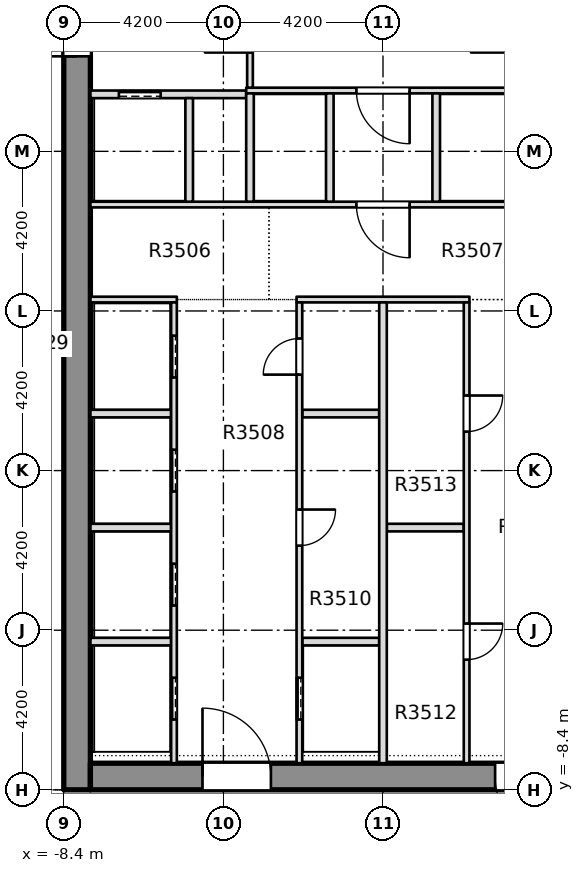
"""IFC4 building model, lengths in metres.
Left out: names, types, materials, properties, quantities, classifications, styles, units other than length and angle.
Written with IfcOpenShell. Run it as: python <this file> out.ifc"""

import sys

from ifc_helpers import new_model, si_unit, direction, frame, frame_2d, origin, place, context, subcontext, project, spatial, rectangle, extrude, element, fill, save


model = new_model("IFC4")
c1 = context("Model", 3, precision=1e-05, world=origin(), true_north=direction((0.0, 1.0)))
c2 = subcontext(c1, "Body", "Model", "MODEL_VIEW")
j1 = project(units=[si_unit("LENGTHUNIT", "METRE"), si_unit("PLANEANGLEUNIT", "RADIAN")], contexts=[c1])
p1 = place(None, origin())
s1 = spatial("IfcSite", under=j1, at=p1, CompositionType="ELEMENT")
p2 = place(p1, origin())
s2 = spatial("IfcBuilding", under=s1, at=p2, CompositionType="ELEMENT")
p3 = place(p2, frame((0.0, 0.0, 140.0)))
s3 = spatial("IfcBuildingStorey", under=s2, at=p3, CompositionType="ELEMENT", Elevation=140.0)
p4 = place(p3, frame((-8.05, -8.4, -0.4), z_axis=(0.0, 0.0, 1.0), x_axis=(0.0, 1.0, 0.0)))
e1 = element("IfcWall", 1, at=p4, inside=s3, PredefinedType="SOLIDWALL", context=c2, shape_type="SweptSolid", body=[
    extrude(rectangle(XDim=30.15, YDim=0.7, at=frame_2d((15.075, 0.0))), origin(), (0.0, 0.0, 1.0), 3.45),
])
p5 = place(p4, frame((19.3, 0.0, 0.4)))
e2 = element("IfcOpeningElement", 2, at=p5, cuts=e1, PredefinedType="OPENING", context=c2, shape_type="SweptSolid", body=[
    extrude(rectangle(XDim=1.2, YDim=2.1, at=frame_2d((0.6, 1.05))), frame((0.0, 0.36, 0.0), z_axis=(0.0, -1.0, 0.0), x_axis=(1.0, 0.0, 0.0)), (0.0, 0.0, 1.0), 0.72),
])
p6 = place(p3, frame((-7.7, -8.05, -0.4), z_axis=(0.0, 0.0, 1.0), x_axis=(1.0, 0.0, 0.0)))
e3 = element("IfcWall", 3, at=p6, inside=s3, PredefinedType="SHEAR", context=c2, shape_type="SweptSolid", body=[
    extrude(rectangle(XDim=15.4, YDim=0.7, at=frame_2d((7.7, 0.0))), origin(), (0.0, 0.0, 1.0), 3.45),
])
p7 = place(p6, frame((2.95, 0.0, 0.4)))
e4 = element("IfcOpeningElement", 4, at=p7, cuts=e3, PredefinedType="OPENING", context=c2, shape_type="SweptSolid", body=[
    extrude(rectangle(XDim=1.8, YDim=2.1, at=frame_2d((0.9, 1.05))), frame((0.0, 0.36, 0.0), z_axis=(0.0, -1.0, 0.0), x_axis=(1.0, 0.0, 0.0)), (0.0, 0.0, 1.0), 0.72),
])
p8 = place(p6, frame((10.65, 0.0, 0.4)))
e5 = element("IfcOpeningElement", 5, at=p8, cuts=e3, PredefinedType="OPENING", context=c2, shape_type="SweptSolid", body=[
    extrude(rectangle(XDim=1.8, YDim=2.1, at=frame_2d((0.9, 1.05))), frame((0.0, 0.36, 0.0), z_axis=(0.0, -1.0, 0.0), x_axis=(1.0, 0.0, 0.0)), (0.0, 0.0, 1.0), 0.72),
])
p9 = place(p3, frame((-7.699, -4.5, 0.0), z_axis=(0.0, 0.0, 1.0), x_axis=(1.0, 0.0, 0.0)))
e6 = element("IfcWall", 6, at=p9, inside=s3, PredefinedType="PARTITIONING", context=c2, shape_type="SweptSolid", body=[
    extrude(rectangle(XDim=2.124, YDim=0.2, at=frame_2d((1.062, 0.0))), origin(), (0.0, 0.0, 1.0), 3.05),
])
p10 = place(p3, frame((-2.125, -4.5, 0.0), z_axis=(0.0, 0.0, 1.0), x_axis=(1.0, 0.0, 0.0)))
e7 = element("IfcWall", 7, at=p10, inside=s3, PredefinedType="PARTITIONING", context=c2, shape_type="SweptSolid", body=[
    extrude(rectangle(XDim=2.025, YDim=0.2, at=frame_2d((1.012, 0.0))), origin(), (0.0, 0.0, 1.0), 3.05),
])
p11 = place(p3, frame((-7.699, -1.5, 0.0), z_axis=(0.0, 0.0, 1.0), x_axis=(1.0, 0.0, 0.0)))
e8 = element("IfcWall", 8, at=p11, inside=s3, PredefinedType="PARTITIONING", context=c2, shape_type="SweptSolid", body=[
    extrude(rectangle(XDim=2.124, YDim=0.2, at=frame_2d((1.062, 0.0))), origin(), (0.0, 0.0, 1.0), 3.05),
])
p12 = place(p3, frame((0.1, -1.5, 0.0), z_axis=(0.0, 0.0, 1.0), x_axis=(1.0, 0.0, 0.0)))
e9 = element("IfcWall", 9, at=p12, inside=s3, PredefinedType="PARTITIONING", context=c2, shape_type="SweptSolid", body=[
    extrude(rectangle(XDim=2.025, YDim=0.2, at=frame_2d((1.012, 0.0))), origin(), (0.0, 0.0, 1.0), 3.05),
])
p13 = place(p3, frame((-7.699, 1.5, 0.0), z_axis=(0.0, 0.0, 1.0), x_axis=(1.0, 0.0, 0.0)))
e10 = element("IfcWall", 10, at=p13, inside=s3, PredefinedType="PARTITIONING", context=c2, shape_type="SweptSolid", body=[
    extrude(rectangle(XDim=2.124, YDim=0.2, at=frame_2d((1.062, 0.0))), origin(), (0.0, 0.0, 1.0), 3.05),
])
p14 = place(p3, frame((-2.125, 1.5, 0.0), z_axis=(0.0, 0.0, 1.0), x_axis=(1.0, 0.0, 0.0)))
e11 = element("IfcWall", 11, at=p14, inside=s3, PredefinedType="PARTITIONING", context=c2, shape_type="SweptSolid", body=[
    extrude(rectangle(XDim=2.025, YDim=0.2, at=frame_2d((1.012, 0.0))), origin(), (0.0, 0.0, 1.0), 3.05),
])
p15 = place(p3, frame((-7.699, 4.5, 0.0), z_axis=(0.0, 0.0, 1.0), x_axis=(1.0, 0.0, 0.0)))
e12 = element("IfcWall", 12, at=p15, inside=s3, PredefinedType="PARTITIONING", context=c2, shape_type="SweptSolid", body=[
    extrude(rectangle(XDim=2.274, YDim=0.15, at=frame_2d((1.137, 0.0))), origin(), (0.0, 0.0, 1.0), 3.05),
])
p16 = place(p3, frame((-2.275, 4.5, 0.0), z_axis=(0.0, 0.0, 1.0), x_axis=(1.0, 0.0, 0.0)))
e13 = element("IfcWall", 13, at=p16, inside=s3, PredefinedType="PARTITIONING", context=c2, shape_type="SweptSolid", body=[
    extrude(rectangle(XDim=4.55, YDim=0.15, at=frame_2d((2.275, 0.0))), origin(), (0.0, 0.0, 1.0), 3.05),
])
p17 = place(p3, frame((-7.699, 7.0, 0.0), z_axis=(0.0, 0.0, 1.0), x_axis=(1.0, 0.0, 0.0)))
e14 = element("IfcWall", 14, at=p17, inside=s3, PredefinedType="PARTITIONING", context=c2, shape_type="SweptSolid", body=[
    extrude(rectangle(XDim=15.398, YDim=0.15, at=frame_2d((7.699, 0.0))), origin(), (0.0, 0.0, 1.0), 3.05),
])
p18 = place(p17, frame((6.999, 0.0, 0.0)))
e15 = element("IfcOpeningElement", 15, at=p18, cuts=e14, PredefinedType="OPENING", context=c2, shape_type="SweptSolid", body=[
    extrude(rectangle(XDim=1.4, YDim=2.1, at=frame_2d((0.7, 1.05))), frame((0.0, 0.085, 0.0), z_axis=(0.0, -1.0, 0.0), x_axis=(1.0, 0.0, 0.0)), (0.0, 0.0, 1.0), 0.17),
])
p19 = place(p3, frame((-7.699, 9.9, 0.0), z_axis=(0.0, 0.0, 1.0), x_axis=(1.0, 0.0, 0.0)))
e16 = element("IfcWall", 16, at=p19, inside=s3, PredefinedType="PARTITIONING", context=c2, shape_type="SweptSolid", body=[
    extrude(rectangle(XDim=4.099, YDim=0.2, at=frame_2d((2.049, 0.0))), origin(), (0.0, 0.0, 1.0), 3.05),
])
p20 = place(p19, frame((0.749, 0.0, 0.0)))
e17 = element("IfcOpeningElement", 17, at=p20, cuts=e16, PredefinedType="OPENING", context=c2, shape_type="SweptSolid", body=[
    extrude(rectangle(XDim=1.1, YDim=2.1, at=frame_2d((0.55, 1.05))), frame((0.0, 0.11, 0.0), z_axis=(0.0, -1.0, 0.0), x_axis=(1.0, 0.0, 0.0)), (0.0, 0.0, 1.0), 0.22),
])
p21 = place(p3, frame((-3.6, 10.0, 0.0), z_axis=(0.0, 0.0, 1.0), x_axis=(1.0, 0.0, 0.0)))
e18 = element("IfcWall", 18, at=p21, inside=s3, PredefinedType="PARTITIONING", context=c2, shape_type="SweptSolid", body=[
    extrude(rectangle(XDim=7.2, YDim=0.15, at=frame_2d((3.6, 0.0))), origin(), (0.0, 0.0, 1.0), 3.05),
])
p22 = place(p21, frame((2.9, 0.0, 0.0)))
e19 = element("IfcOpeningElement", 19, at=p22, cuts=e18, PredefinedType="OPENING", context=c2, shape_type="SweptSolid", body=[
    extrude(rectangle(XDim=1.4, YDim=2.1, at=frame_2d((0.7, 1.05))), frame((0.0, 0.085, 0.0), z_axis=(0.0, -1.0, 0.0), x_axis=(1.0, 0.0, 0.0)), (0.0, 0.0, 1.0), 0.17),
])
p23 = place(p3, frame((-5.5, -7.699, 0.0), z_axis=(0.0, 0.0, 1.0), x_axis=(0.0, 1.0, 0.0)))
e20 = element("IfcWall", 20, at=p23, inside=s3, PredefinedType="PARTITIONING", context=c2, shape_type="SweptSolid", body=[
    extrude(rectangle(XDim=12.124, YDim=0.15, at=frame_2d((6.062, 0.0))), origin(), (0.0, 0.0, 1.0), 3.05),
])
p24 = place(p23, frame((1.149, 0.0, 0.0)))
e21 = element("IfcOpeningElement", 21, at=p24, cuts=e20, PredefinedType="OPENING", context=c2, shape_type="SweptSolid", body=[
    extrude(rectangle(XDim=1.1, YDim=2.1, at=frame_2d((0.55, 1.05))), frame((0.0, 0.085, 0.0), z_axis=(0.0, -1.0, 0.0), x_axis=(1.0, 0.0, 0.0)), (0.0, 0.0, 1.0), 0.17),
])
p25 = place(p23, frame((4.149, 0.0, 0.0)))
e22 = element("IfcOpeningElement", 22, at=p25, cuts=e20, PredefinedType="OPENING", context=c2, shape_type="SweptSolid", body=[
    extrude(rectangle(XDim=1.1, YDim=2.1, at=frame_2d((0.55, 1.05))), frame((0.0, 0.085, 0.0), z_axis=(0.0, -1.0, 0.0), x_axis=(1.0, 0.0, 0.0)), (0.0, 0.0, 1.0), 0.17),
])
p26 = place(p23, frame((7.149, 0.0, 0.0)))
e23 = element("IfcOpeningElement", 23, at=p26, cuts=e20, PredefinedType="OPENING", context=c2, shape_type="SweptSolid", body=[
    extrude(rectangle(XDim=1.1, YDim=2.1, at=frame_2d((0.55, 1.05))), frame((0.0, 0.085, 0.0), z_axis=(0.0, -1.0, 0.0), x_axis=(1.0, 0.0, 0.0)), (0.0, 0.0, 1.0), 0.17),
])
p27 = place(p23, frame((10.149, 0.0, 0.0)))
e24 = element("IfcOpeningElement", 24, at=p27, cuts=e20, PredefinedType="OPENING", context=c2, shape_type="SweptSolid", body=[
    extrude(rectangle(XDim=1.1, YDim=2.1, at=frame_2d((0.55, 1.05))), frame((0.0, 0.085, 0.0), z_axis=(0.0, -1.0, 0.0), x_axis=(1.0, 0.0, 0.0)), (0.0, 0.0, 1.0), 0.17),
])
p28 = place(p3, frame((-5.1, 7.075, 0.0), z_axis=(0.0, 0.0, 1.0), x_axis=(0.0, 1.0, 0.0)))
e25 = element("IfcWall", 25, at=p28, inside=s3, PredefinedType="PARTITIONING", context=c2, shape_type="SweptSolid", body=[
    extrude(rectangle(XDim=2.725, YDim=0.2, at=frame_2d((1.363, 0.0))), origin(), (0.0, 0.0, 1.0), 3.05),
])
p29 = place(p3, frame((-3.5, 7.075, 0.0), z_axis=(0.0, 0.0, 1.0), x_axis=(0.0, 1.0, 0.0)))
e26 = element("IfcWall", 26, at=p29, inside=s3, PredefinedType="PARTITIONING", context=c2, shape_type="SweptSolid", body=[
    extrude(rectangle(XDim=2.85, YDim=0.2, at=frame_2d((1.425, 0.0))), origin(), (0.0, 0.0, 1.0), 3.05),
])
p30 = place(p3, frame((-3.5, 10.075, 0.0), z_axis=(0.0, 0.0, 1.0), x_axis=(0.0, 1.0, 0.0)))
e27 = element("IfcWall", 27, at=p30, inside=s3, PredefinedType="PARTITIONING", context=c2, shape_type="SweptSolid", body=[
    extrude(rectangle(XDim=3.075, YDim=0.15, at=frame_2d((1.538, 0.0))), origin(), (0.0, 0.0, 1.0), 3.05),
])
p31 = place(p30, frame((0.925, 0.0, 0.0)))
e28 = element("IfcOpeningElement", 28, at=p31, cuts=e27, PredefinedType="OPENING", context=c2, shape_type="SweptSolid", body=[
    extrude(rectangle(XDim=1.2, YDim=2.1, at=frame_2d((0.6, 1.05))), frame((0.0, 0.085, 0.0), z_axis=(0.0, -1.0, 0.0), x_axis=(1.0, 0.0, 0.0)), (0.0, 0.0, 1.0), 0.17),
])
p32 = place(p3, frame((-2.2, -7.699, 0.0), z_axis=(0.0, 0.0, 1.0), x_axis=(0.0, 1.0, 0.0)))
e29 = element("IfcWall", 29, at=p32, inside=s3, PredefinedType="PARTITIONING", context=c2, shape_type="SweptSolid", body=[
    extrude(rectangle(XDim=12.124, YDim=0.15, at=frame_2d((6.062, 0.0))), origin(), (0.0, 0.0, 1.0), 3.05),
])
p33 = place(p32, frame((1.149, 0.0, 0.0)))
e30 = element("IfcOpeningElement", 30, at=p33, cuts=e29, PredefinedType="OPENING", context=c2, shape_type="SweptSolid", body=[
    extrude(rectangle(XDim=1.1, YDim=2.1, at=frame_2d((0.55, 1.05))), frame((0.0, 0.085, 0.0), z_axis=(0.0, -1.0, 0.0), x_axis=(1.0, 0.0, 0.0)), (0.0, 0.0, 1.0), 0.17),
])
p34 = place(p32, frame((5.724, 0.0, 0.0)))
e31 = element("IfcOpeningElement", 31, at=p34, cuts=e29, PredefinedType="OPENING", context=c2, shape_type="SweptSolid", body=[
    extrude(rectangle(XDim=0.95, YDim=2.1, at=frame_2d((0.475, 1.05))), frame((0.0, 0.085, 0.0), z_axis=(0.0, -1.0, 0.0), x_axis=(1.0, 0.0, 0.0)), (0.0, 0.0, 1.0), 0.17),
])
p35 = place(p32, frame((10.224, 0.0, 0.0)))
e32 = element("IfcOpeningElement", 32, at=p35, cuts=e29, PredefinedType="OPENING", context=c2, shape_type="SweptSolid", body=[
    extrude(rectangle(XDim=0.95, YDim=2.1, at=frame_2d((0.475, 1.05))), frame((0.0, 0.085, 0.0), z_axis=(0.0, -1.0, 0.0), x_axis=(1.0, 0.0, 0.0)), (0.0, 0.0, 1.0), 0.17),
])
p36 = place(p3, frame((-1.4, 7.075, 0.0), z_axis=(0.0, 0.0, 1.0), x_axis=(0.0, 1.0, 0.0)))
e33 = element("IfcWall", 33, at=p36, inside=s3, PredefinedType="PARTITIONING", context=c2, shape_type="SweptSolid", body=[
    extrude(rectangle(XDim=2.85, YDim=0.2, at=frame_2d((1.425, 0.0))), origin(), (0.0, 0.0, 1.0), 3.05),
])
p37 = place(p3, frame((0.0, -7.699, 0.0), z_axis=(0.0, 0.0, 1.0), x_axis=(0.0, 1.0, 0.0)))
e34 = element("IfcWall", 34, at=p37, inside=s3, PredefinedType="PARTITIONING", context=c2, shape_type="SweptSolid", body=[
    extrude(rectangle(XDim=12.124, YDim=0.2, at=frame_2d((6.062, 0.0))), origin(), (0.0, 0.0, 1.0), 3.05),
])
p38 = place(p3, frame((1.4, 7.075, 0.0), z_axis=(0.0, 0.0, 1.0), x_axis=(0.0, 1.0, 0.0)))
e35 = element("IfcWall", 35, at=p38, inside=s3, PredefinedType="PARTITIONING", context=c2, shape_type="SweptSolid", body=[
    extrude(rectangle(XDim=2.85, YDim=0.2, at=frame_2d((1.425, 0.0))), origin(), (0.0, 0.0, 1.0), 3.05),
])
p39 = place(p3, frame((2.2, -7.699, 0.0), z_axis=(0.0, 0.0, 1.0), x_axis=(0.0, 1.0, 0.0)))
e36 = element("IfcWall", 36, at=p39, inside=s3, PredefinedType="PARTITIONING", context=c2, shape_type="SweptSolid", body=[
    extrude(rectangle(XDim=12.124, YDim=0.15, at=frame_2d((6.062, 0.0))), origin(), (0.0, 0.0, 1.0), 3.05),
])
p40 = place(p39, frame((2.724, 0.0, 0.0)))
e37 = element("IfcOpeningElement", 37, at=p40, cuts=e36, PredefinedType="OPENING", context=c2, shape_type="SweptSolid", body=[
    extrude(rectangle(XDim=0.95, YDim=2.1, at=frame_2d((0.475, 1.05))), frame((0.0, 0.085, 0.0), z_axis=(0.0, -1.0, 0.0), x_axis=(1.0, 0.0, 0.0)), (0.0, 0.0, 1.0), 0.17),
])
p41 = place(p39, frame((8.724, 0.0, 0.0)))
e38 = element("IfcOpeningElement", 38, at=p41, cuts=e36, PredefinedType="OPENING", context=c2, shape_type="SweptSolid", body=[
    extrude(rectangle(XDim=0.95, YDim=2.1, at=frame_2d((0.475, 1.05))), frame((0.0, 0.085, 0.0), z_axis=(0.0, -1.0, 0.0), x_axis=(1.0, 0.0, 0.0)), (0.0, 0.0, 1.0), 0.17),
])
p42 = place(p24, origin())
e39 = element("IfcDoor", 39, at=p42, inside=s3, OperationType="SLIDING_TO_LEFT", PredefinedType="DOOR", context=c2, shape_type="SweptSolid", body=[
    extrude(rectangle(XDim=1.1, YDim=2.1, at=frame_2d((0.55, 1.05))), frame((0.0, 0.025, 0.0), z_axis=(0.0, -1.0, 0.0), x_axis=(1.0, 0.0, 0.0)), (0.0, 0.0, 1.0), 0.05),
])
fill(e21, e39)
p43 = place(p25, origin())
e40 = element("IfcDoor", 40, at=p43, inside=s3, OperationType="SLIDING_TO_LEFT", PredefinedType="DOOR", context=c2, shape_type="SweptSolid", body=[
    extrude(rectangle(XDim=1.1, YDim=2.1, at=frame_2d((0.55, 1.05))), frame((0.0, 0.025, 0.0), z_axis=(0.0, -1.0, 0.0), x_axis=(1.0, 0.0, 0.0)), (0.0, 0.0, 1.0), 0.05),
])
fill(e22, e40)
p44 = place(p26, origin())
e41 = element("IfcDoor", 41, at=p44, inside=s3, OperationType="SLIDING_TO_LEFT", PredefinedType="DOOR", context=c2, shape_type="SweptSolid", body=[
    extrude(rectangle(XDim=1.1, YDim=2.1, at=frame_2d((0.55, 1.05))), frame((0.0, 0.025, 0.0), z_axis=(0.0, -1.0, 0.0), x_axis=(1.0, 0.0, 0.0)), (0.0, 0.0, 1.0), 0.05),
])
fill(e23, e41)
p45 = place(p27, origin())
e42 = element("IfcDoor", 42, at=p45, inside=s3, OperationType="SLIDING_TO_LEFT", PredefinedType="DOOR", context=c2, shape_type="SweptSolid", body=[
    extrude(rectangle(XDim=1.1, YDim=2.1, at=frame_2d((0.55, 1.05))), frame((0.0, 0.025, 0.0), z_axis=(0.0, -1.0, 0.0), x_axis=(1.0, 0.0, 0.0)), (0.0, 0.0, 1.0), 0.05),
])
fill(e24, e42)
p46 = place(p33, origin())
e43 = element("IfcDoor", 43, at=p46, inside=s3, OperationType="SLIDING_TO_LEFT", PredefinedType="DOOR", context=c2, shape_type="SweptSolid", body=[
    extrude(rectangle(XDim=1.1, YDim=2.1, at=frame_2d((0.55, 1.05))), frame((0.0, 0.025, 0.0), z_axis=(0.0, -1.0, 0.0), x_axis=(1.0, 0.0, 0.0)), (0.0, 0.0, 1.0), 0.05),
])
fill(e30, e43)
p47 = place(p34, origin())
e44 = element("IfcDoor", 44, at=p47, inside=s3, OperationType="SINGLE_SWING_LEFT", PredefinedType="DOOR", context=c2, shape_type="SweptSolid", body=[
    extrude(rectangle(XDim=0.95, YDim=2.1, at=frame_2d((0.475, 1.05))), frame((0.0, 0.025, 0.0), z_axis=(0.0, -1.0, 0.0), x_axis=(1.0, 0.0, 0.0)), (0.0, 0.0, 1.0), 0.05),
])
fill(e31, e44)
p48 = place(p35, origin())
e45 = element("IfcDoor", 45, at=p48, inside=s3, OperationType="SINGLE_SWING_RIGHT", PredefinedType="DOOR", context=c2, shape_type="SweptSolid", body=[
    extrude(rectangle(XDim=0.95, YDim=2.1, at=frame_2d((0.475, 1.05))), frame((0.0, 0.025, 0.0), z_axis=(0.0, -1.0, 0.0), x_axis=(1.0, 0.0, 0.0)), (0.0, 0.0, 1.0), 0.05),
])
fill(e32, e45)
p49 = place(p40, origin())
e46 = element("IfcDoor", 46, at=p49, inside=s3, OperationType="SINGLE_SWING_RIGHT", PredefinedType="DOOR", context=c2, shape_type="SweptSolid", body=[
    extrude(rectangle(XDim=0.95, YDim=2.1, at=frame_2d((0.475, 1.05))), frame((0.0, 0.025, 0.0), z_axis=(0.0, -1.0, 0.0), x_axis=(1.0, 0.0, 0.0)), (0.0, 0.0, 1.0), 0.05),
])
fill(e37, e46)
p50 = place(p41, origin())
e47 = element("IfcDoor", 47, at=p50, inside=s3, OperationType="SINGLE_SWING_RIGHT", PredefinedType="DOOR", context=c2, shape_type="SweptSolid", body=[
    extrude(rectangle(XDim=0.95, YDim=2.1, at=frame_2d((0.475, 1.05))), frame((0.0, 0.025, 0.0), z_axis=(0.0, -1.0, 0.0), x_axis=(1.0, 0.0, 0.0)), (0.0, 0.0, 1.0), 0.05),
])
fill(e38, e47)
p51 = place(p20, origin())
e48 = element("IfcDoor", 48, at=p51, inside=s3, OperationType="SLIDING_TO_RIGHT", PredefinedType="DOOR", context=c2, shape_type="SweptSolid", body=[
    extrude(rectangle(XDim=1.1, YDim=2.1, at=frame_2d((0.55, 1.05))), frame((0.0, 0.025, 0.0), z_axis=(0.0, -1.0, 0.0), x_axis=(1.0, 0.0, 0.0)), (0.0, 0.0, 1.0), 0.05),
])
fill(e17, e48)
p52 = place(p18, origin())
e49 = element("IfcDoor", 49, at=p52, inside=s3, OperationType="SINGLE_SWING_RIGHT", PredefinedType="DOOR", context=c2, shape_type="SweptSolid", body=[
    extrude(rectangle(XDim=1.4, YDim=2.1, at=frame_2d((0.7, 1.05))), frame((0.0, 0.025, 0.0), z_axis=(0.0, -1.0, 0.0), x_axis=(1.0, 0.0, 0.0)), (0.0, 0.0, 1.0), 0.05),
])
fill(e15, e49)
p53 = place(p22, origin())
e50 = element("IfcDoor", 50, at=p53, inside=s3, OperationType="SINGLE_SWING_RIGHT", PredefinedType="DOOR", context=c2, shape_type="SweptSolid", body=[
    extrude(rectangle(XDim=1.4, YDim=2.1, at=frame_2d((0.7, 1.05))), frame((0.0, 0.025, 0.0), z_axis=(0.0, -1.0, 0.0), x_axis=(1.0, 0.0, 0.0)), (0.0, 0.0, 1.0), 0.05),
])
fill(e19, e50)
p54 = place(p7, origin())
e51 = element("IfcDoor", 51, at=p54, inside=s3, OperationType="SINGLE_SWING_LEFT", PredefinedType="DOOR", context=c2, shape_type="SweptSolid", body=[
    extrude(rectangle(XDim=1.8, YDim=2.1, at=frame_2d((0.9, 1.05))), frame((0.0, 0.025, 0.0), z_axis=(0.0, -1.0, 0.0), x_axis=(1.0, 0.0, 0.0)), (0.0, 0.0, 1.0), 0.05),
])
fill(e4, e51)
p55 = place(p8, origin())
e52 = element("IfcDoor", 52, at=p55, inside=s3, OperationType="SINGLE_SWING_LEFT", PredefinedType="DOOR", context=c2, shape_type="SweptSolid", body=[
    extrude(rectangle(XDim=1.8, YDim=2.1, at=frame_2d((0.9, 1.05))), frame((0.0, 0.025, 0.0), z_axis=(0.0, -1.0, 0.0), x_axis=(1.0, 0.0, 0.0)), (0.0, 0.0, 1.0), 0.05),
])
fill(e5, e52)
p56 = place(p5, origin())
e53 = element("IfcDoor", 53, at=p56, inside=s3, OperationType="SINGLE_SWING_LEFT", PredefinedType="DOOR", context=c2, shape_type="SweptSolid", body=[
    extrude(rectangle(XDim=1.2, YDim=2.1, at=frame_2d((0.6, 1.05))), frame((0.0, 0.025, 0.0), z_axis=(0.0, -1.0, 0.0), x_axis=(1.0, 0.0, 0.0)), (0.0, 0.0, 1.0), 0.05),
])
fill(e2, e53)
save(model, sys.argv[1])
